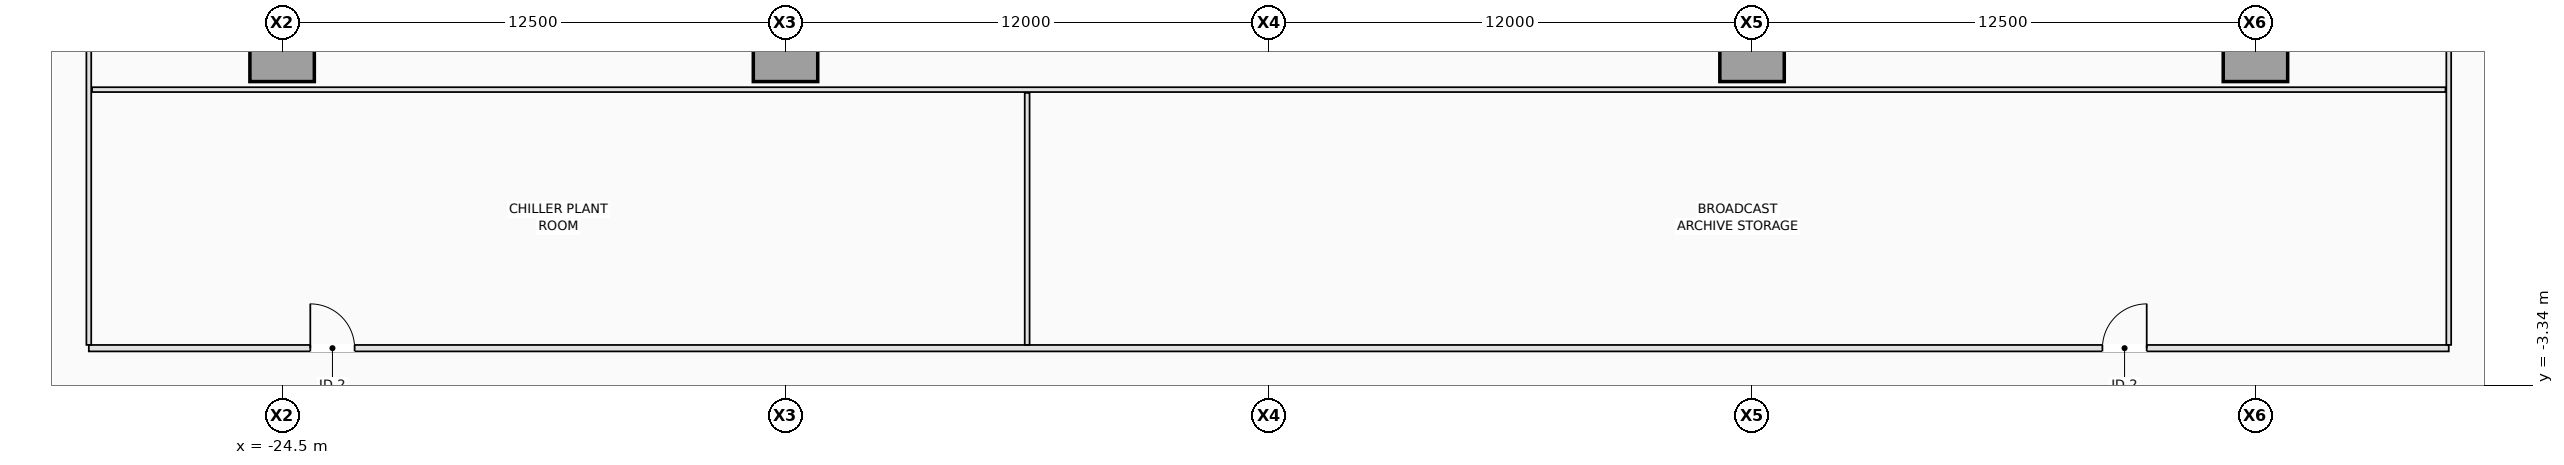
"""IFC4 building model, lengths in metres.
Left out: names, types, materials, properties, quantities, classifications, styles, units other than length and angle.
Written with IfcOpenShell. Run it as: python <this file> out.ifc"""

import sys

from ifc_helpers import new_model, si_unit, direction, frame, frame_2d, origin, origin_2d, place, context, subcontext, project, spatial, rectangle, extrude, element, fill, save


model = new_model("IFC4")
c1 = context("Model", 3, precision=1e-05, world=origin(), true_north=direction((0.0, 1.0)))
c2 = subcontext(c1, "Body", "Model", "MODEL_VIEW")
j1 = project(units=[si_unit("LENGTHUNIT", "METRE"), si_unit("PLANEANGLEUNIT", "RADIAN")], contexts=[c1])
p1 = place(None, origin())
s1 = spatial("IfcSite", under=j1, at=p1, CompositionType="ELEMENT")
p2 = place(p1, origin())
s2 = spatial("IfcBuilding", under=s1, at=p2, CompositionType="ELEMENT")
p3 = place(p2, frame((0.0, 0.0, -10.0)))
s3 = spatial("IfcBuildingStorey", under=s2, at=p3, CompositionType="ELEMENT", Elevation=-10.0)
for number, where, z_axis, x_axis in (
    (1, (-24.5, 5.0, -0.45), (0.0, 0.0, 1.0), (1.0, 0.0, 0.0)),
    (2, (-12.0, 5.0, -0.45), (0.0, 0.0, 1.0), (1.0, 0.0, 0.0)),
    (3, (12.0, 5.0, -0.45), (0.0, 0.0, 1.0), (1.0, 0.0, 0.0)),
    (4, (24.5, 5.0, -0.45), (0.0, 0.0, 1.0), (1.0, 0.0, 0.0)),
):
    element("IfcColumn", number, at=place(p3, frame(where, z_axis=z_axis, x_axis=x_axis)), inside=s3, PredefinedType="COLUMN", context=c2, shape_type="SweptSolid", body=[
        extrude(rectangle(XDim=1.6, YDim=1.6, at=origin_2d()), origin(), (0.0, 0.0, 1.0), 5.45),
    ])
p4 = place(p3, frame((-29.3, -2.42, 0.0), z_axis=(0.0, 0.0, 1.0), x_axis=(1.0, 0.0, 0.0)))
e5 = element("IfcWall", 5, at=p4, inside=s3, PredefinedType="PARTITIONING", context=c2, shape_type="SweptSolid", body=[
    extrude(rectangle(XDim=58.6, YDim=0.16, at=frame_2d((29.3, 0.0))), origin(), (0.0, 0.0, 1.0), 4.68),
])
p5 = place(p4, frame((5.5, 0.0, 0.0)))
e6 = element("IfcOpeningElement", 6, at=p5, cuts=e5, PredefinedType="OPENING", context=c2, shape_type="SweptSolid", body=[
    extrude(rectangle(XDim=1.1, YDim=2.15, at=frame_2d((0.55, 1.075))), frame((0.0, 0.09, 0.0), z_axis=(0.0, -1.0, 0.0), x_axis=(1.0, 0.0, 0.0)), (0.0, 0.0, 1.0), 0.18),
])
p6 = place(p4, frame((50.0, 0.0, 0.0)))
e7 = element("IfcOpeningElement", 7, at=p6, cuts=e5, PredefinedType="OPENING", context=c2, shape_type="SweptSolid", body=[
    extrude(rectangle(XDim=1.1, YDim=2.15, at=frame_2d((0.55, 1.075))), frame((0.0, 0.09, 0.0), z_axis=(0.0, -1.0, 0.0), x_axis=(1.0, 0.0, 0.0)), (0.0, 0.0, 1.0), 0.18),
])
p7 = place(p3, frame((-29.3, -2.338, 0.0), z_axis=(0.0, 0.0, 1.0), x_axis=(0.0, 1.0, 0.0)))
e8 = element("IfcWall", 8, at=p7, inside=s3, PredefinedType="PARTITIONING", context=c2, shape_type="SweptSolid", body=[
    extrude(rectangle(XDim=15.088, YDim=0.12, at=frame_2d((7.544, 0.0))), origin(), (0.0, 0.0, 1.0), 4.68),
])
p8 = place(p7, frame((7.538, 0.0, 0.0)))
e9 = element("IfcOpeningElement", 9, at=p8, cuts=e8, PredefinedType="OPENING", context=c2, shape_type="SweptSolid", body=[
    extrude(rectangle(XDim=1.1, YDim=2.15, at=frame_2d((0.55, 1.075))), frame((0.0, 0.07, 0.0), z_axis=(0.0, -1.0, 0.0), x_axis=(1.0, 0.0, 0.0)), (0.0, 0.0, 1.0), 0.14),
])
p9 = place(p3, frame((29.3, -2.338, 0.0), z_axis=(0.0, 0.0, 1.0), x_axis=(0.0, 1.0, 0.0)))
e10 = element("IfcWall", 10, at=p9, inside=s3, PredefinedType="PARTITIONING", context=c2, shape_type="SweptSolid", body=[
    extrude(rectangle(XDim=15.088, YDim=0.12, at=frame_2d((7.544, 0.0))), origin(), (0.0, 0.0, 1.0), 4.68),
])
p10 = place(p3, frame((-6.0, -2.338, 0.0), z_axis=(0.0, 0.0, 1.0), x_axis=(0.0, 1.0, 0.0)))
e11 = element("IfcWall", 11, at=p10, inside=s3, PredefinedType="PARTITIONING", context=c2, shape_type="SweptSolid", body=[
    extrude(rectangle(XDim=6.258, YDim=0.12, at=frame_2d((3.129, 0.0))), origin(), (0.0, 0.0, 1.0), 4.68),
])
p11 = place(p3, frame((-29.22, 4.0, 0.0), z_axis=(0.0, 0.0, 1.0), x_axis=(1.0, 0.0, 0.0)))
e12 = element("IfcWall", 12, at=p11, inside=s3, PredefinedType="PARTITIONING", context=c2, shape_type="SweptSolid", body=[
    extrude(rectangle(XDim=58.44, YDim=0.12, at=frame_2d((29.22, 0.0))), origin(), (0.0, 0.0, 1.0), 4.68),
])
p12 = place(p5, origin())
e13 = element("IfcDoor", 13, at=p12, inside=s3, OperationType="SINGLE_SWING_LEFT", PredefinedType="DOOR", context=c2, shape_type="SweptSolid", body=[
    extrude(rectangle(XDim=1.1, YDim=2.15, at=frame_2d((0.55, 1.075))), frame((0.0, 0.025, 0.0), z_axis=(0.0, -1.0, 0.0), x_axis=(1.0, 0.0, 0.0)), (0.0, 0.0, 1.0), 0.05),
])
fill(e6, e13)
p13 = place(p6, origin())
e14 = element("IfcDoor", 14, at=p13, inside=s3, OperationType="SINGLE_SWING_RIGHT", PredefinedType="DOOR", context=c2, shape_type="SweptSolid", body=[
    extrude(rectangle(XDim=1.1, YDim=2.15, at=frame_2d((0.55, 1.075))), frame((0.0, 0.025, 0.0), z_axis=(0.0, -1.0, 0.0), x_axis=(1.0, 0.0, 0.0)), (0.0, 0.0, 1.0), 0.05),
])
fill(e7, e14)
save(model, sys.argv[1])
